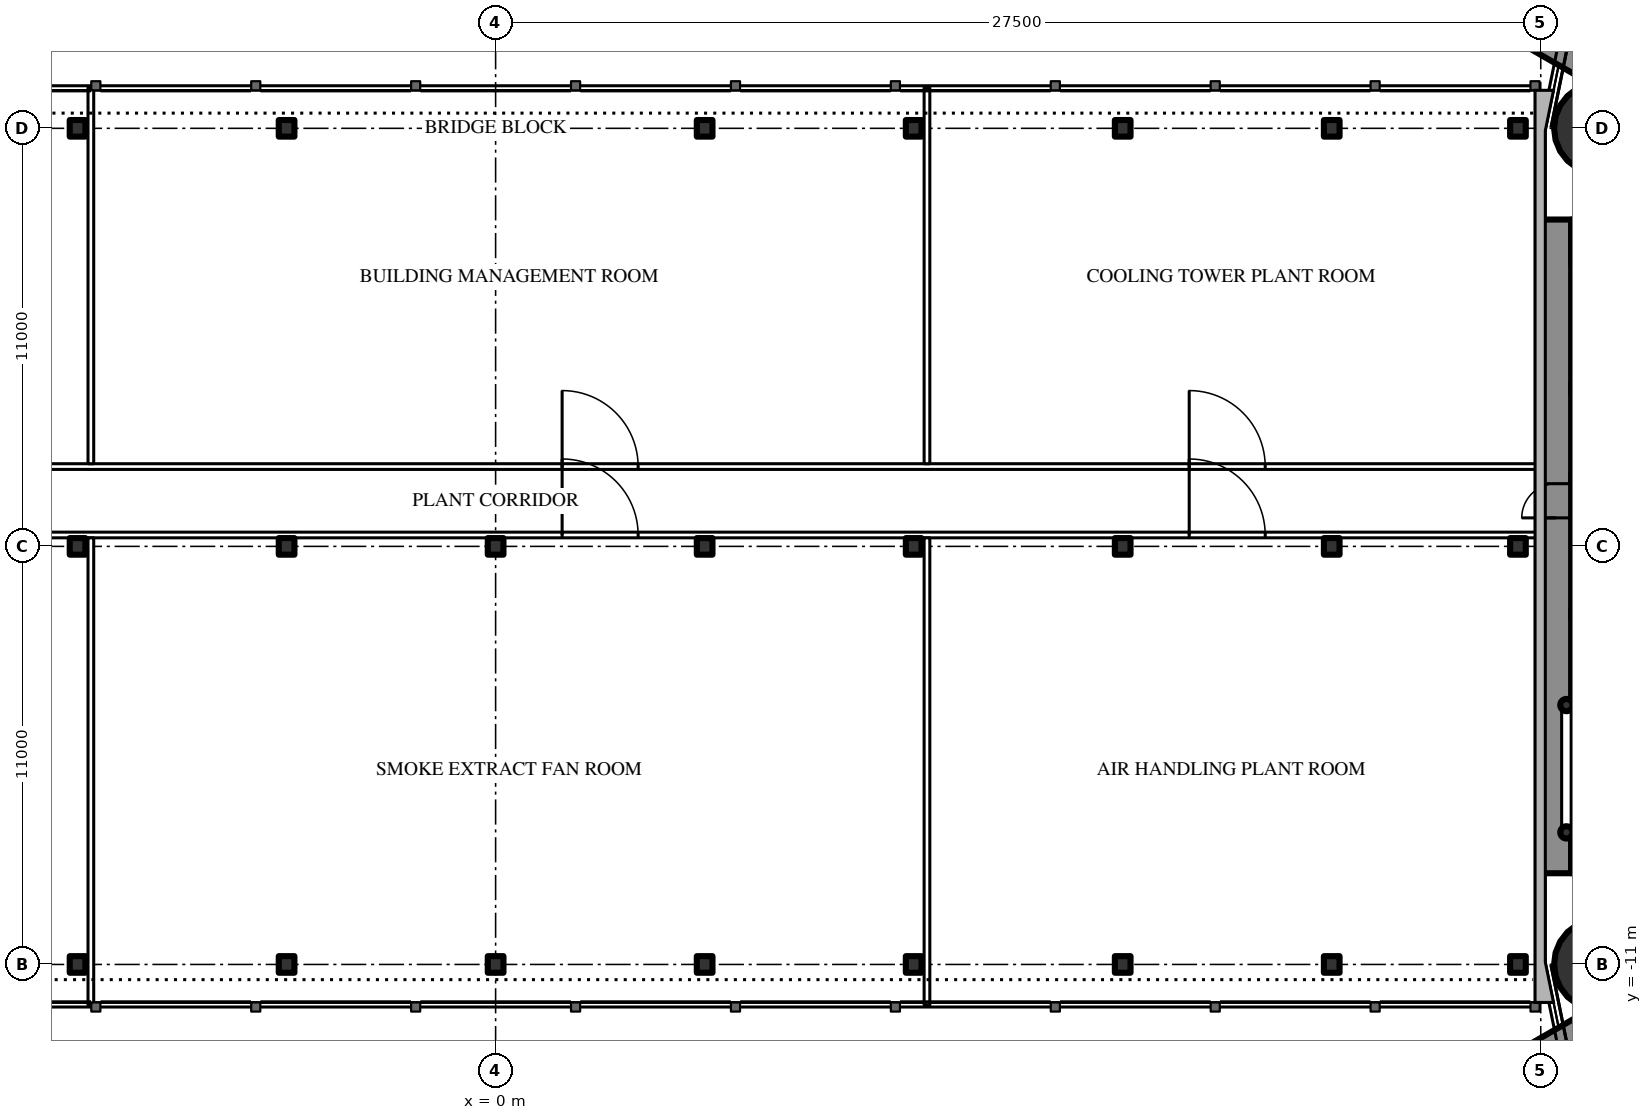
"""IFC4 building model, lengths in metres.
Left out: names, types, materials, properties, quantities, classifications, styles, units other than length and angle.
Written with IfcOpenShell. Run it as: python <this file> out.ifc"""

import sys

from ifc_helpers import new_model, si_unit, direction, frame, frame_2d, origin, origin_2d, place, context, subcontext, project, spatial, rectangle, circle, hollow_circle, i_section, extrude, element, fill, save


model = new_model("IFC4")
c1 = context("Model", 3, precision=1e-05, world=origin(), true_north=direction((0.0, 1.0)))
c2 = subcontext(c1, "Body", "Model", "MODEL_VIEW")
j1 = project(units=[si_unit("LENGTHUNIT", "METRE"), si_unit("PLANEANGLEUNIT", "RADIAN")], contexts=[c1])
p1 = place(None, origin())
s1 = spatial("IfcSite", under=j1, at=p1, CompositionType="ELEMENT")
p2 = place(p1, origin())
s2 = spatial("IfcBuilding", under=s1, at=p2, CompositionType="ELEMENT")
p3 = place(p2, frame((0.0, 0.0, 268.3)))
s3 = spatial("IfcBuildingStorey", under=s2, at=p3, CompositionType="ELEMENT", Elevation=268.3)
for number, where, z_axis, x_axis in (
    (1, (29.05, 11.0, 0.0), (0.0, 0.0, 1.0), (1.0, 0.0, 0.0)),
    (2, (29.05, -11.0, 0.0), (0.0, 0.0, 1.0), (1.0, 0.0, 0.0)),
):
    element("IfcColumn", number, at=place(p3, frame(where, z_axis=z_axis, x_axis=x_axis)), inside=s3, PredefinedType="COLUMN", context=c2, shape_type="SweptSolid", body=[
        extrude(circle(Radius=1.2, at=origin_2d()), origin(), (0.0, 0.0, 1.0), 5.0),
    ])
p4 = place(p3, frame((27.9, -8.6, 0.0), z_axis=(0.0, 0.0, 1.0), x_axis=(0.0, 1.0, 0.0)))
e3 = element("IfcWall", 3, at=p4, inside=s3, PredefinedType="SHEAR", context=c2, shape_type="SweptSolid", body=[
    extrude(rectangle(XDim=17.2, YDim=0.8, at=frame_2d((8.6, 0.0))), origin(), (0.0, 0.0, 1.0), 5.0),
])
p5 = place(p4, frame((9.35, 0.0, 0.0)))
e4 = element("IfcOpeningElement", 4, at=p5, cuts=e3, PredefinedType="OPENING", context=c2, shape_type="SweptSolid", body=[
    extrude(rectangle(XDim=0.9, YDim=2.2, at=frame_2d((0.45, 1.1))), frame((0.0, 0.41, 0.0), z_axis=(0.0, -1.0, 0.0), x_axis=(1.0, 0.0, 0.0)), (0.0, 0.0, 1.0), 0.82),
])
p6 = place(p3, frame((28.3, -8.0, 0.0), z_axis=(0.0, 0.0, 1.0), x_axis=(1.0, 0.0, 0.0)))
e5 = element("IfcWall", 5, at=p6, inside=s3, PredefinedType="SHEAR", context=c2, shape_type="SweptSolid", body=[
    extrude(rectangle(XDim=8.4, YDim=1.2, at=frame_2d((4.2, 0.0))), origin(), (0.0, 0.0, 1.0), 5.0),
])
p7 = place(p6, frame((0.25, 0.0, 0.0)))
e6 = element("IfcOpeningElement", 6, at=p7, cuts=e5, PredefinedType="OPENING", context=c2, shape_type="SweptSolid", body=[
    extrude(rectangle(XDim=1.0, YDim=2.2, at=frame_2d((0.5, 1.1))), frame((0.0, 0.61, 0.0), z_axis=(0.0, -1.0, 0.0), x_axis=(1.0, 0.0, 0.0)), (0.0, 0.0, 1.0), 1.22),
])
p8 = place(p3, frame((28.3, 8.0, 0.0), z_axis=(0.0, 0.0, 1.0), x_axis=(1.0, 0.0, 0.0)))
e7 = element("IfcWall", 7, at=p8, inside=s3, PredefinedType="SHEAR", context=c2, shape_type="SweptSolid", body=[
    extrude(rectangle(XDim=8.4, YDim=1.2, at=frame_2d((4.2, 0.0))), origin(), (0.0, 0.0, 1.0), 5.0),
])
p9 = place(p8, frame((0.25, 0.0, 0.0)))
e8 = element("IfcOpeningElement", 8, at=p9, cuts=e7, PredefinedType="OPENING", context=c2, shape_type="SweptSolid", body=[
    extrude(rectangle(XDim=1.0, YDim=2.2, at=frame_2d((0.5, 1.1))), frame((0.0, 0.61, 0.0), z_axis=(0.0, -1.0, 0.0), x_axis=(1.0, 0.0, 0.0)), (0.0, 0.0, 1.0), 1.22),
])
for number, where, z_axis, x_axis in (
    (9, (28.3, -4.15, 0.0), (0.0, 0.0, 1.0), (1.0, 0.0, 0.0)),
    (10, (28.3, 4.15, 0.0), (0.0, 0.0, 1.0), (1.0, 0.0, 0.0)),
):
    element("IfcWall", number, at=place(p3, frame(where, z_axis=z_axis, x_axis=x_axis)), inside=s3, PredefinedType="SHEAR", context=c2, shape_type="SweptSolid", body=[
        extrude(rectangle(XDim=8.4, YDim=0.3, at=frame_2d((4.2, 0.0))), origin(), (0.0, 0.0, 1.0), 5.0),
    ])
for number, where, z_axis, x_axis in (
    (11, (28.3, -1.775, 0.0), (0.0, 0.0, 1.0), (1.0, 0.0, 0.0)),
    (12, (28.3, 1.775, 0.0), (0.0, 0.0, 1.0), (1.0, 0.0, 0.0)),
):
    element("IfcWall", number, at=place(p3, frame(where, z_axis=z_axis, x_axis=x_axis)), inside=s3, PredefinedType="SHEAR", context=c2, shape_type="SweptSolid", body=[
        extrude(rectangle(XDim=2.9, YDim=0.25, at=frame_2d((1.45, 0.0))), origin(), (0.0, 0.0, 1.0), 5.0),
    ])
p10 = place(p3, frame((27.2, -13.8, 0.0), z_axis=(0.0, 0.0, 1.0), x_axis=(0.866027159892, 0.499996958321, 0.0)))
e13 = element("IfcWall", 13, at=p10, inside=s3, PredefinedType="SHEAR", context=c2, shape_type="SweptSolid", body=[
    extrude(rectangle(XDim=27.947, YDim=1.2, at=frame_2d((13.973, 0.0))), origin(), (0.0, 0.0, 1.0), 5.0),
])
p11 = place(p10, frame((4.6, 0.0, 0.0)))
e14 = element("IfcOpeningElement", 14, at=p11, cuts=e13, PredefinedType="OPENING", context=c2, shape_type="SweptSolid", body=[
    extrude(rectangle(XDim=1.0, YDim=2.2, at=frame_2d((0.5, 1.1))), frame((0.0, 0.61, 0.0), z_axis=(0.0, -1.0, 0.0), x_axis=(1.0, 0.0, 0.0)), (0.0, 0.0, 1.0), 1.22),
])
p12 = place(p10, frame((13.395, 0.0, 0.0)))
e15 = element("IfcOpeningElement", 15, at=p12, cuts=e13, PredefinedType="OPENING", context=c2, shape_type="SweptSolid", body=[
    extrude(rectangle(XDim=1.8, YDim=2.2, at=frame_2d((0.9, 1.1))), frame((0.0, 0.61, 0.0), z_axis=(0.0, -1.0, 0.0), x_axis=(1.0, 0.0, 0.0)), (0.0, 0.0, 1.0), 1.22),
])
p13 = place(p3, frame((27.2, 13.8, 0.0), z_axis=(0.0, 0.0, 1.0), x_axis=(0.866024515034, -0.500001539357, 0.0)))
e16 = element("IfcWall", 16, at=p13, inside=s3, PredefinedType="SHEAR", context=c2, shape_type="SweptSolid", body=[
    extrude(rectangle(XDim=26.907, YDim=1.2, at=frame_2d((13.454, 0.0))), origin(), (0.0, 0.0, 1.0), 5.0),
])
p14 = place(p13, frame((4.6, 0.0, 0.0)))
e17 = element("IfcOpeningElement", 17, at=p14, cuts=e16, PredefinedType="OPENING", context=c2, shape_type="SweptSolid", body=[
    extrude(rectangle(XDim=1.0, YDim=2.2, at=frame_2d((0.5, 1.1))), frame((0.0, 0.61, 0.0), z_axis=(0.0, -1.0, 0.0), x_axis=(1.0, 0.0, 0.0)), (0.0, 0.0, 1.0), 1.22),
])
p15 = place(p13, frame((13.395, 0.0, 0.0)))
e18 = element("IfcOpeningElement", 18, at=p15, cuts=e16, PredefinedType="OPENING", context=c2, shape_type="SweptSolid", body=[
    extrude(rectangle(XDim=1.8, YDim=2.2, at=frame_2d((0.9, 1.1))), frame((0.0, 0.61, 0.0), z_axis=(0.0, -1.0, 0.0), x_axis=(1.0, 0.0, 0.0)), (0.0, 0.0, 1.0), 1.22),
])
for number, where, z_axis, x_axis in (
    (19, (-11.0, -11.0, 0.0), (0.0, 0.0, 1.0), (1.0, 0.0, 0.0)),
    (20, (-5.5, -11.0, 0.0), (0.0, 0.0, 1.0), (1.0, 0.0, 0.0)),
    (21, (0.0, -11.0, 0.0), (0.0, 0.0, 1.0), (1.0, 0.0, 0.0)),
    (22, (5.5, -11.0, 0.0), (0.0, 0.0, 1.0), (1.0, 0.0, 0.0)),
    (23, (11.0, -11.0, 0.0), (0.0, 0.0, 1.0), (1.0, 0.0, 0.0)),
    (24, (16.5, -11.0, 0.0), (0.0, 0.0, 1.0), (1.0, 0.0, 0.0)),
    (25, (22.0, -11.0, 0.0), (0.0, 0.0, 1.0), (1.0, 0.0, 0.0)),
    (26, (26.9, -11.0, 0.0), (0.0, 0.0, 1.0), (1.0, 0.0, 0.0)),
    (27, (-11.0, 0.0, 0.0), (0.0, 0.0, 1.0), (1.0, 0.0, 0.0)),
    (28, (-5.5, 0.0, 0.0), (0.0, 0.0, 1.0), (1.0, 0.0, 0.0)),
    (29, (0.0, 0.0, 0.0), (0.0, 0.0, 1.0), (1.0, 0.0, 0.0)),
    (30, (5.5, 0.0, 0.0), (0.0, 0.0, 1.0), (1.0, 0.0, 0.0)),
    (31, (11.0, 0.0, 0.0), (0.0, 0.0, 1.0), (1.0, 0.0, 0.0)),
    (32, (16.5, 0.0, 0.0), (0.0, 0.0, 1.0), (1.0, 0.0, 0.0)),
    (33, (22.0, 0.0, 0.0), (0.0, 0.0, 1.0), (1.0, 0.0, 0.0)),
    (34, (26.9, 0.0, 0.0), (0.0, 0.0, 1.0), (1.0, 0.0, 0.0)),
    (35, (-11.0, 11.0, 0.0), (0.0, 0.0, 1.0), (1.0, 0.0, 0.0)),
    (36, (-5.5, 11.0, 0.0), (0.0, 0.0, 1.0), (1.0, 0.0, 0.0)),
    (37, (0.0, 11.0, 0.0), (0.0, 0.0, 1.0), (1.0, 0.0, 0.0)),
    (38, (5.5, 11.0, 0.0), (0.0, 0.0, 1.0), (1.0, 0.0, 0.0)),
    (39, (11.0, 11.0, 0.0), (0.0, 0.0, 1.0), (1.0, 0.0, 0.0)),
    (40, (16.5, 11.0, 0.0), (0.0, 0.0, 1.0), (1.0, 0.0, 0.0)),
    (41, (22.0, 11.0, 0.0), (0.0, 0.0, 1.0), (1.0, 0.0, 0.0)),
    (42, (26.9, 11.0, 0.0), (0.0, 0.0, 1.0), (1.0, 0.0, 0.0)),
):
    element("IfcColumn", number, at=place(p3, frame(where, z_axis=z_axis, x_axis=x_axis)), inside=s3, PredefinedType="COLUMN", context=c2, shape_type="SweptSolid", body=[
        extrude(i_section(OverallWidth=0.412, OverallDepth=0.437, WebThickness=0.036, FlangeThickness=0.058, FilletRadius=0.015, at=origin_2d()), origin(), (0.0, 0.0, 1.0), 5.0),
    ])
for number, where, z_axis, x_axis in (
    (43, (28.175, -7.525, 5.0), (0.0, 0.0, 1.0), (1.0, 0.0, 0.0)),
    (44, (28.175, -4.175, 5.0), (0.0, 0.0, 1.0), (1.0, 0.0, 0.0)),
):
    element("IfcColumn", number, at=place(p3, frame(where, z_axis=z_axis, x_axis=x_axis)), inside=s3, PredefinedType="COLUMN", context=c2, shape_type="SweptSolid", body=[
        extrude(hollow_circle(Radius=0.162, WallThickness=0.012, at=origin_2d()), origin(), (0.0, 0.0, 1.0), 3.0),
    ])
p16 = place(p3, frame((28.175, -7.422, 5.0), z_axis=(0.0, 0.0, 1.0), x_axis=(0.0, 1.0, 0.0)))
e45 = element("IfcWall", 45, at=p16, inside=s3, PredefinedType="SOLIDWALL", context=c2, shape_type="SweptSolid", body=[
    extrude(rectangle(XDim=3.144, YDim=0.25, at=frame_2d((1.572, 0.0))), origin(), (0.0, 0.0, 1.0), 2.54),
])
p17 = place(p3, frame((28.278, -7.525, 5.0), z_axis=(0.0, 0.0, 1.0), x_axis=(1.0, 0.0, 0.0)))
e46 = element("IfcWall", 46, at=p17, inside=s3, PredefinedType="SOLIDWALL", context=c2, shape_type="SweptSolid", body=[
    extrude(rectangle(XDim=8.444, YDim=0.25, at=frame_2d((4.222, 0.0))), origin(), (0.0, 0.0, 1.0), 2.54),
])
p18 = place(p3, frame((28.278, -4.175, 5.0), z_axis=(0.0, 0.0, 1.0), x_axis=(1.0, 0.0, 0.0)))
e47 = element("IfcWall", 47, at=p18, inside=s3, PredefinedType="SOLIDWALL", context=c2, shape_type="SweptSolid", body=[
    extrude(rectangle(XDim=8.444, YDim=0.25, at=frame_2d((4.222, 0.0))), origin(), (0.0, 0.0, 1.0), 2.54),
])
p19 = place(p18, frame((0.222, 0.0, 0.0)))
e48 = element("IfcOpeningElement", 48, at=p19, cuts=e47, PredefinedType="OPENING", context=c2, shape_type="SweptSolid", body=[
    extrude(rectangle(XDim=1.0, YDim=2.2, at=frame_2d((0.5, 1.1))), frame((0.0, 0.135, 0.0), z_axis=(0.0, -1.0, 0.0), x_axis=(1.0, 0.0, 0.0)), (0.0, 0.0, 1.0), 0.27),
])
p20 = place(p3, frame((-27.5, 0.3, 0.0), z_axis=(0.0, 0.0, 1.0), x_axis=(1.0, 0.0, 0.0)))
e49 = element("IfcWall", 49, at=p20, inside=s3, PredefinedType="PARTITIONING", context=c2, shape_type="SweptSolid", body=[
    extrude(rectangle(XDim=55.0, YDim=0.15, at=frame_2d((27.5, 0.0))), origin(), (0.0, 0.0, 1.0), 4.163),
])
p21 = place(p20, frame((7.25, 0.0, 0.0)))
e50 = element("IfcOpeningElement", 50, at=p21, cuts=e49, PredefinedType="OPENING", context=c2, shape_type="SweptSolid", body=[
    extrude(rectangle(XDim=2.0, YDim=2.4, at=frame_2d((1.0, 1.2))), frame((0.0, 0.085, 0.0), z_axis=(0.0, -1.0, 0.0), x_axis=(1.0, 0.0, 0.0)), (0.0, 0.0, 1.0), 0.17),
])
p22 = place(p20, frame((29.25, 0.0, 0.0)))
e51 = element("IfcOpeningElement", 51, at=p22, cuts=e49, PredefinedType="OPENING", context=c2, shape_type="SweptSolid", body=[
    extrude(rectangle(XDim=2.0, YDim=2.4, at=frame_2d((1.0, 1.2))), frame((0.0, 0.085, 0.0), z_axis=(0.0, -1.0, 0.0), x_axis=(1.0, 0.0, 0.0)), (0.0, 0.0, 1.0), 0.17),
])
p23 = place(p20, frame((45.75, 0.0, 0.0)))
e52 = element("IfcOpeningElement", 52, at=p23, cuts=e49, PredefinedType="OPENING", context=c2, shape_type="SweptSolid", body=[
    extrude(rectangle(XDim=2.0, YDim=2.4, at=frame_2d((1.0, 1.2))), frame((0.0, 0.085, 0.0), z_axis=(0.0, -1.0, 0.0), x_axis=(1.0, 0.0, 0.0)), (0.0, 0.0, 1.0), 0.17),
])
p24 = place(p3, frame((-27.5, 2.1, 0.0), z_axis=(0.0, 0.0, 1.0), x_axis=(1.0, 0.0, 0.0)))
e53 = element("IfcWall", 53, at=p24, inside=s3, PredefinedType="PARTITIONING", context=c2, shape_type="SweptSolid", body=[
    extrude(rectangle(XDim=55.0, YDim=0.15, at=frame_2d((27.5, 0.0))), origin(), (0.0, 0.0, 1.0), 4.7),
])
p25 = place(p24, frame((7.25, 0.0, 0.0)))
e54 = element("IfcOpeningElement", 54, at=p25, cuts=e53, PredefinedType="OPENING", context=c2, shape_type="SweptSolid", body=[
    extrude(rectangle(XDim=2.0, YDim=2.4, at=frame_2d((1.0, 1.2))), frame((0.0, 0.085, 0.0), z_axis=(0.0, -1.0, 0.0), x_axis=(1.0, 0.0, 0.0)), (0.0, 0.0, 1.0), 0.17),
])
p26 = place(p24, frame((29.25, 0.0, 0.0)))
e55 = element("IfcOpeningElement", 55, at=p26, cuts=e53, PredefinedType="OPENING", context=c2, shape_type="SweptSolid", body=[
    extrude(rectangle(XDim=2.0, YDim=2.4, at=frame_2d((1.0, 1.2))), frame((0.0, 0.085, 0.0), z_axis=(0.0, -1.0, 0.0), x_axis=(1.0, 0.0, 0.0)), (0.0, 0.0, 1.0), 0.17),
])
p27 = place(p24, frame((45.75, 0.0, 0.0)))
e56 = element("IfcOpeningElement", 56, at=p27, cuts=e53, PredefinedType="OPENING", context=c2, shape_type="SweptSolid", body=[
    extrude(rectangle(XDim=2.0, YDim=2.4, at=frame_2d((1.0, 1.2))), frame((0.0, 0.085, 0.0), z_axis=(0.0, -1.0, 0.0), x_axis=(1.0, 0.0, 0.0)), (0.0, 0.0, 1.0), 0.17),
])
for number, where, z_axis, x_axis in (
    (57, (-10.65, -12.07, 0.0), (0.0, 0.0, 1.0), (0.0, 1.0, 0.0)),
    (58, (11.35, -12.07, 0.0), (0.0, 0.0, 1.0), (0.0, 1.0, 0.0)),
):
    element("IfcWall", number, at=place(p3, frame(where, z_axis=z_axis, x_axis=x_axis)), inside=s3, PredefinedType="PARTITIONING", context=c2, shape_type="SweptSolid", body=[
        extrude(rectangle(XDim=12.295, YDim=0.15, at=frame_2d((6.147, 0.0))), origin(), (0.0, 0.0, 1.0), 4.7),
    ])
for number, where, z_axis, x_axis in (
    (59, (-10.65, 2.175, 0.0), (0.0, 0.0, 1.0), (0.0, 1.0, 0.0)),
    (60, (11.35, 2.175, 0.0), (0.0, 0.0, 1.0), (0.0, 1.0, 0.0)),
):
    element("IfcWall", number, at=place(p3, frame(where, z_axis=z_axis, x_axis=x_axis)), inside=s3, PredefinedType="PARTITIONING", context=c2, shape_type="SweptSolid", body=[
        extrude(rectangle(XDim=9.895, YDim=0.15, at=frame_2d((4.948, 0.0))), origin(), (0.0, 0.0, 1.0), 4.7),
    ])
p28 = place(p5, origin())
e61 = element("IfcDoor", 61, at=p28, inside=s3, OperationType="SINGLE_SWING_LEFT", PredefinedType="DOOR", context=c2, shape_type="SweptSolid", body=[
    extrude(rectangle(XDim=0.9, YDim=2.2, at=frame_2d((0.45, 1.1))), frame((0.0, 0.025, 0.0), z_axis=(0.0, -1.0, 0.0), x_axis=(1.0, 0.0, 0.0)), (0.0, 0.0, 1.0), 0.05),
])
fill(e4, e61)
p29 = place(p22, origin())
e62 = element("IfcDoor", 62, at=p29, inside=s3, OperationType="DOUBLE_DOOR_SINGLE_SWING", PredefinedType="DOOR", context=c2, shape_type="SweptSolid", body=[
    extrude(rectangle(XDim=2.0, YDim=2.4, at=frame_2d((1.0, 1.2))), frame((0.0, 0.025, 0.0), z_axis=(0.0, -1.0, 0.0), x_axis=(1.0, 0.0, 0.0)), (0.0, 0.0, 1.0), 0.05),
])
fill(e51, e62)
p30 = place(p23, origin())
e63 = element("IfcDoor", 63, at=p30, inside=s3, OperationType="DOUBLE_DOOR_SINGLE_SWING", PredefinedType="DOOR", context=c2, shape_type="SweptSolid", body=[
    extrude(rectangle(XDim=2.0, YDim=2.4, at=frame_2d((1.0, 1.2))), frame((0.0, 0.025, 0.0), z_axis=(0.0, -1.0, 0.0), x_axis=(1.0, 0.0, 0.0)), (0.0, 0.0, 1.0), 0.05),
])
fill(e52, e63)
p31 = place(p26, origin())
e64 = element("IfcDoor", 64, at=p31, inside=s3, OperationType="DOUBLE_DOOR_SINGLE_SWING", PredefinedType="DOOR", context=c2, shape_type="SweptSolid", body=[
    extrude(rectangle(XDim=2.0, YDim=2.4, at=frame_2d((1.0, 1.2))), frame((0.0, 0.025, 0.0), z_axis=(0.0, -1.0, 0.0), x_axis=(1.0, 0.0, 0.0)), (0.0, 0.0, 1.0), 0.05),
])
fill(e55, e64)
p32 = place(p27, origin())
e65 = element("IfcDoor", 65, at=p32, inside=s3, OperationType="DOUBLE_DOOR_SINGLE_SWING", PredefinedType="DOOR", context=c2, shape_type="SweptSolid", body=[
    extrude(rectangle(XDim=2.0, YDim=2.4, at=frame_2d((1.0, 1.2))), frame((0.0, 0.025, 0.0), z_axis=(0.0, -1.0, 0.0), x_axis=(1.0, 0.0, 0.0)), (0.0, 0.0, 1.0), 0.05),
])
fill(e56, e65)
save(model, sys.argv[1])
